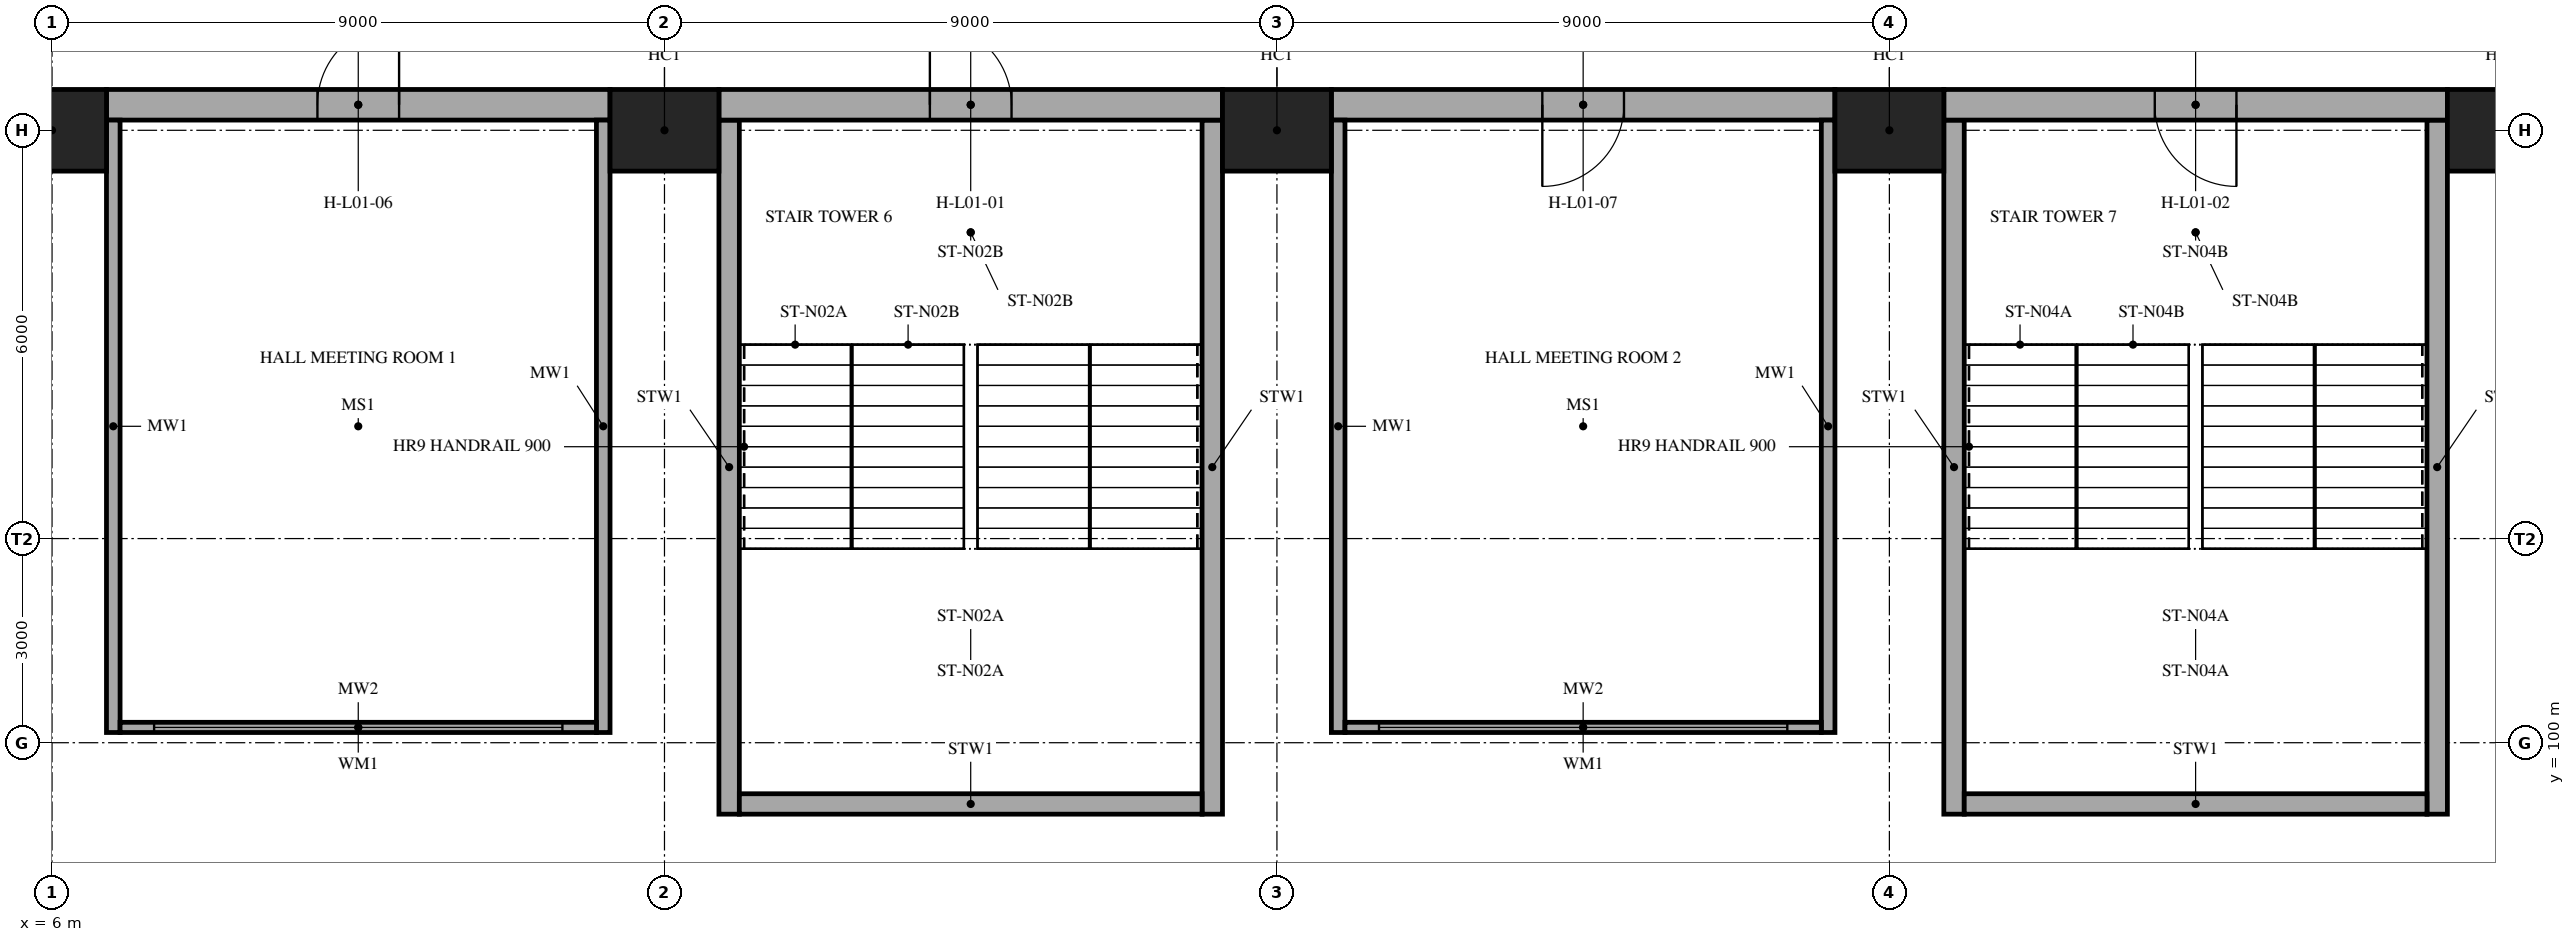
"""IFC4 building model, lengths in metres.
Left out: names, types, materials, properties, quantities, classifications, styles, units other than length and angle.
Written with IfcOpenShell. Run it as: python <this file> out.ifc"""

import sys

from ifc_helpers import new_model, si_unit, direction, frame, frame_2d, origin, origin_2d, place, context, subcontext, project, spatial, rectangle, extrude, element, fill, save


model = new_model("IFC4")
c1 = context("Model", 3, precision=1e-05, world=origin(), true_north=direction((0.0, 1.0)))
c2 = subcontext(c1, "Body", "Model", "MODEL_VIEW")
j1 = project(units=[si_unit("LENGTHUNIT", "METRE"), si_unit("PLANEANGLEUNIT", "RADIAN")], contexts=[c1])
p1 = place(None, origin())
s1 = spatial("IfcSite", under=j1, at=p1, CompositionType="ELEMENT")
p2 = place(p1, origin())
s2 = spatial("IfcBuilding", under=s1, at=p2, CompositionType="ELEMENT")
p3 = place(p2, frame((0.0, 0.0, 5.0)))
s3 = spatial("IfcBuildingStorey", under=s2, at=p3, CompositionType="ELEMENT", Elevation=5.0)
for number, where, z_axis, x_axis in (
    (1, (6.0, 109.0, 0.0), (0.0, 0.0, 1.0), (1.0, 0.0, 0.0)),
    (2, (15.0, 109.0, 0.0), (0.0, 0.0, 1.0), (1.0, 0.0, 0.0)),
    (3, (24.0, 109.0, 0.0), (0.0, 0.0, 1.0), (1.0, 0.0, 0.0)),
    (4, (33.0, 109.0, 0.0), (0.0, 0.0, 1.0), (1.0, 0.0, 0.0)),
    (5, (42.0, 109.0, 0.0), (0.0, 0.0, 1.0), (1.0, 0.0, 0.0)),
):
    element("IfcColumn", number, at=place(p3, frame(where, z_axis=z_axis, x_axis=x_axis)), inside=s3, PredefinedType="COLUMN", context=c2, shape_type="SweptSolid", body=[
        extrude(rectangle(XDim=1.6, YDim=1.2, at=origin_2d()), origin(), (0.0, 0.0, 1.0), 5.0),
    ])
for number, where, z_axis, x_axis in (
    (6, (15.95, 109.15, 0.0), (0.0, 0.0, 1.0), (0.0, -1.0, 0.0)),
    (7, (23.05, 109.15, 0.0), (0.0, 0.0, 1.0), (0.0, -1.0, 0.0)),
):
    element("IfcWall", number, at=place(p3, frame(where, z_axis=z_axis, x_axis=x_axis)), inside=s3, PredefinedType="SHEAR", context=c2, shape_type="SweptSolid", body=[
        extrude(rectangle(XDim=10.2, YDim=0.3, at=frame_2d((5.1, 0.0))), origin(), (0.0, 0.0, 1.0), 5.0),
    ])
p4 = place(p3, frame((16.1, 99.1, 0.0), z_axis=(0.0, 0.0, 1.0), x_axis=(1.0, 0.0, 0.0)))
e8 = element("IfcWall", 8, at=p4, inside=s3, PredefinedType="SHEAR", context=c2, shape_type="SweptSolid", body=[
    extrude(rectangle(XDim=6.8, YDim=0.3, at=frame_2d((3.4, 0.0))), origin(), (0.0, 0.0, 1.0), 5.0),
])
for number, where, z_axis, x_axis in (
    (9, (33.95, 109.15, 0.0), (0.0, 0.0, 1.0), (0.0, -1.0, 0.0)),
    (10, (41.05, 109.15, 0.0), (0.0, 0.0, 1.0), (0.0, -1.0, 0.0)),
):
    element("IfcWall", number, at=place(p3, frame(where, z_axis=z_axis, x_axis=x_axis)), inside=s3, PredefinedType="SHEAR", context=c2, shape_type="SweptSolid", body=[
        extrude(rectangle(XDim=10.2, YDim=0.3, at=frame_2d((5.1, 0.0))), origin(), (0.0, 0.0, 1.0), 5.0),
    ])
p5 = place(p3, frame((34.1, 99.1, 0.0), z_axis=(0.0, 0.0, 1.0), x_axis=(1.0, 0.0, 0.0)))
e11 = element("IfcWall", 11, at=p5, inside=s3, PredefinedType="SHEAR", context=c2, shape_type="SweptSolid", body=[
    extrude(rectangle(XDim=6.8, YDim=0.3, at=frame_2d((3.4, 0.0))), origin(), (0.0, 0.0, 1.0), 5.0),
])
p6 = place(p3, frame((6.8, 109.375, 0.0), z_axis=(0.0, 0.0, 1.0), x_axis=(1.0, 0.0, 0.0)))
e12 = element("IfcWall", 12, at=p6, inside=s3, PredefinedType="SOLIDWALL", context=c2, shape_type="SweptSolid", body=[
    extrude(rectangle(XDim=7.4, YDim=0.45, at=frame_2d((3.7, 0.0))), origin(), (0.0, 0.0, 1.0), 5.0),
])
p7 = place(p6, frame((3.1, 0.0, 0.0)))
e13 = element("IfcOpeningElement", 13, at=p7, cuts=e12, PredefinedType="OPENING", context=c2, shape_type="SweptSolid", body=[
    extrude(rectangle(XDim=1.2, YDim=2.1, at=frame_2d((0.6, 1.05))), frame((0.0, 0.235, 0.0), z_axis=(0.0, -1.0, 0.0), x_axis=(1.0, 0.0, 0.0)), (0.0, 0.0, 1.0), 0.47),
])
p8 = place(p3, frame((15.8, 109.375, 0.0), z_axis=(0.0, 0.0, 1.0), x_axis=(1.0, 0.0, 0.0)))
e14 = element("IfcWall", 14, at=p8, inside=s3, PredefinedType="SOLIDWALL", context=c2, shape_type="SweptSolid", body=[
    extrude(rectangle(XDim=7.4, YDim=0.45, at=frame_2d((3.7, 0.0))), origin(), (0.0, 0.0, 1.0), 5.0),
])
p9 = place(p8, frame((3.1, 0.0, 0.0)))
e15 = element("IfcOpeningElement", 15, at=p9, cuts=e14, PredefinedType="OPENING", context=c2, shape_type="SweptSolid", body=[
    extrude(rectangle(XDim=1.2, YDim=2.1, at=frame_2d((0.6, 1.05))), frame((0.0, 0.235, 0.0), z_axis=(0.0, -1.0, 0.0), x_axis=(1.0, 0.0, 0.0)), (0.0, 0.0, 1.0), 0.47),
])
p10 = place(p3, frame((24.8, 109.375, 0.0), z_axis=(0.0, 0.0, 1.0), x_axis=(1.0, 0.0, 0.0)))
e16 = element("IfcWall", 16, at=p10, inside=s3, PredefinedType="SOLIDWALL", context=c2, shape_type="SweptSolid", body=[
    extrude(rectangle(XDim=7.4, YDim=0.45, at=frame_2d((3.7, 0.0))), origin(), (0.0, 0.0, 1.0), 5.0),
])
p11 = place(p10, frame((3.1, 0.0, 0.0)))
e17 = element("IfcOpeningElement", 17, at=p11, cuts=e16, PredefinedType="OPENING", context=c2, shape_type="SweptSolid", body=[
    extrude(rectangle(XDim=1.2, YDim=2.1, at=frame_2d((0.6, 1.05))), frame((0.0, 0.235, 0.0), z_axis=(0.0, -1.0, 0.0), x_axis=(1.0, 0.0, 0.0)), (0.0, 0.0, 1.0), 0.47),
])
p12 = place(p3, frame((33.8, 109.375, 0.0), z_axis=(0.0, 0.0, 1.0), x_axis=(1.0, 0.0, 0.0)))
e18 = element("IfcWall", 18, at=p12, inside=s3, PredefinedType="SOLIDWALL", context=c2, shape_type="SweptSolid", body=[
    extrude(rectangle(XDim=7.4, YDim=0.45, at=frame_2d((3.7, 0.0))), origin(), (0.0, 0.0, 1.0), 5.0),
])
p13 = place(p12, frame((3.1, 0.0, 0.0)))
e19 = element("IfcOpeningElement", 19, at=p13, cuts=e18, PredefinedType="OPENING", context=c2, shape_type="SweptSolid", body=[
    extrude(rectangle(XDim=1.2, YDim=2.1, at=frame_2d((0.6, 1.05))), frame((0.0, 0.235, 0.0), z_axis=(0.0, -1.0, 0.0), x_axis=(1.0, 0.0, 0.0)), (0.0, 0.0, 1.0), 0.47),
])
for number, where, z_axis, x_axis in (
    (20, (6.9, 100.15, 0.0), (0.0, 0.0, 1.0), (0.0, 1.0, 0.0)),
    (21, (14.1, 100.15, 0.0), (0.0, 0.0, 1.0), (0.0, 1.0, 0.0)),
):
    element("IfcWall", number, at=place(p3, frame(where, z_axis=z_axis, x_axis=x_axis)), inside=s3, PredefinedType="SHEAR", context=c2, shape_type="SweptSolid", body=[
        extrude(rectangle(XDim=9.0, YDim=0.2, at=frame_2d((4.5, 0.0))), origin(), (0.0, 0.0, 1.0), 4.75),
    ])
p14 = place(p3, frame((7.0, 100.225, 0.0), z_axis=(0.0, 0.0, 1.0), x_axis=(1.0, 0.0, 0.0)))
e22 = element("IfcWall", 22, at=p14, inside=s3, PredefinedType="PARTITIONING", context=c2, shape_type="SweptSolid", body=[
    extrude(rectangle(XDim=7.0, YDim=0.15, at=frame_2d((3.5, 0.0))), origin(), (0.0, 0.0, 1.0), 4.75),
])
p15 = place(p14, frame((0.5, 0.0, 0.9)))
e23 = element("IfcOpeningElement", 23, at=p15, cuts=e22, PredefinedType="OPENING", context=c2, shape_type="SweptSolid", body=[
    extrude(rectangle(XDim=6.0, YDim=2.7, at=frame_2d((3.0, 1.35))), frame((0.0, 0.085, 0.0), z_axis=(0.0, -1.0, 0.0), x_axis=(1.0, 0.0, 0.0)), (0.0, 0.0, 1.0), 0.17),
])
for number, where, z_axis, x_axis in (
    (24, (24.9, 100.15, 0.0), (0.0, 0.0, 1.0), (0.0, 1.0, 0.0)),
    (25, (32.1, 100.15, 0.0), (0.0, 0.0, 1.0), (0.0, 1.0, 0.0)),
):
    element("IfcWall", number, at=place(p3, frame(where, z_axis=z_axis, x_axis=x_axis)), inside=s3, PredefinedType="SHEAR", context=c2, shape_type="SweptSolid", body=[
        extrude(rectangle(XDim=9.0, YDim=0.2, at=frame_2d((4.5, 0.0))), origin(), (0.0, 0.0, 1.0), 4.75),
    ])
p16 = place(p3, frame((25.0, 100.225, 0.0), z_axis=(0.0, 0.0, 1.0), x_axis=(1.0, 0.0, 0.0)))
e26 = element("IfcWall", 26, at=p16, inside=s3, PredefinedType="PARTITIONING", context=c2, shape_type="SweptSolid", body=[
    extrude(rectangle(XDim=7.0, YDim=0.15, at=frame_2d((3.5, 0.0))), origin(), (0.0, 0.0, 1.0), 4.75),
])
p17 = place(p16, frame((0.5, 0.0, 0.9)))
e27 = element("IfcOpeningElement", 27, at=p17, cuts=e26, PredefinedType="OPENING", context=c2, shape_type="SweptSolid", body=[
    extrude(rectangle(XDim=6.0, YDim=2.7, at=frame_2d((3.0, 1.35))), frame((0.0, 0.085, 0.0), z_axis=(0.0, -1.0, 0.0), x_axis=(1.0, 0.0, 0.0)), (0.0, 0.0, 1.0), 0.17),
])
p18 = place(p9, origin())
e28 = element("IfcDoor", 28, at=p18, inside=s3, OperationType="SINGLE_SWING_LEFT", PredefinedType="DOOR", context=c2, shape_type="SweptSolid", body=[
    extrude(rectangle(XDim=1.2, YDim=2.1, at=frame_2d((0.6, 1.05))), frame((0.0, 0.025, 0.0), z_axis=(0.0, -1.0, 0.0), x_axis=(1.0, 0.0, 0.0)), (0.0, 0.0, 1.0), 0.05),
])
fill(e15, e28)
p19 = place(p13, frame((1.2, 0.0, 0.0), z_axis=(0.0, 0.0, 1.0), x_axis=(-1.0, 0.0, 0.0)))
e29 = element("IfcDoor", 29, at=p19, inside=s3, OperationType="SINGLE_SWING_LEFT", PredefinedType="DOOR", context=c2, shape_type="SweptSolid", body=[
    extrude(rectangle(XDim=1.2, YDim=2.1, at=frame_2d((0.6, 1.05))), frame((0.0, 0.025, 0.0), z_axis=(0.0, -1.0, 0.0), x_axis=(1.0, 0.0, 0.0)), (0.0, 0.0, 1.0), 0.05),
])
fill(e19, e29)
p20 = place(p15, origin())
e30 = element("IfcWindow", 30, at=p20, inside=s3, PartitioningType="TRIPLE_PANEL_VERTICAL", PredefinedType="WINDOW", context=c2, shape_type="SweptSolid", body=[
    extrude(rectangle(XDim=6.0, YDim=2.7, at=frame_2d((3.0, 1.35))), frame((0.0, 0.03, 0.0), z_axis=(0.0, -1.0, 0.0), x_axis=(1.0, 0.0, 0.0)), (0.0, 0.0, 1.0), 0.06),
])
fill(e23, e30)
p21 = place(p7, origin())
e31 = element("IfcDoor", 31, at=p21, inside=s3, OperationType="SINGLE_SWING_RIGHT", PredefinedType="DOOR", context=c2, shape_type="SweptSolid", body=[
    extrude(rectangle(XDim=1.2, YDim=2.1, at=frame_2d((0.6, 1.05))), frame((0.0, 0.025, 0.0), z_axis=(0.0, -1.0, 0.0), x_axis=(1.0, 0.0, 0.0)), (0.0, 0.0, 1.0), 0.05),
])
fill(e13, e31)
p22 = place(p17, origin())
e32 = element("IfcWindow", 32, at=p22, inside=s3, PartitioningType="TRIPLE_PANEL_VERTICAL", PredefinedType="WINDOW", context=c2, shape_type="SweptSolid", body=[
    extrude(rectangle(XDim=6.0, YDim=2.7, at=frame_2d((3.0, 1.35))), frame((0.0, 0.03, 0.0), z_axis=(0.0, -1.0, 0.0), x_axis=(1.0, 0.0, 0.0)), (0.0, 0.0, 1.0), 0.06),
])
fill(e27, e32)
p23 = place(p11, frame((1.2, 0.0, 0.0), z_axis=(0.0, 0.0, 1.0), x_axis=(-1.0, 0.0, 0.0)))
e33 = element("IfcDoor", 33, at=p23, inside=s3, OperationType="SINGLE_SWING_RIGHT", PredefinedType="DOOR", context=c2, shape_type="SweptSolid", body=[
    extrude(rectangle(XDim=1.2, YDim=2.1, at=frame_2d((0.6, 1.05))), frame((0.0, 0.025, 0.0), z_axis=(0.0, -1.0, 0.0), x_axis=(1.0, 0.0, 0.0)), (0.0, 0.0, 1.0), 0.05),
])
fill(e17, e33)
save(model, sys.argv[1])
